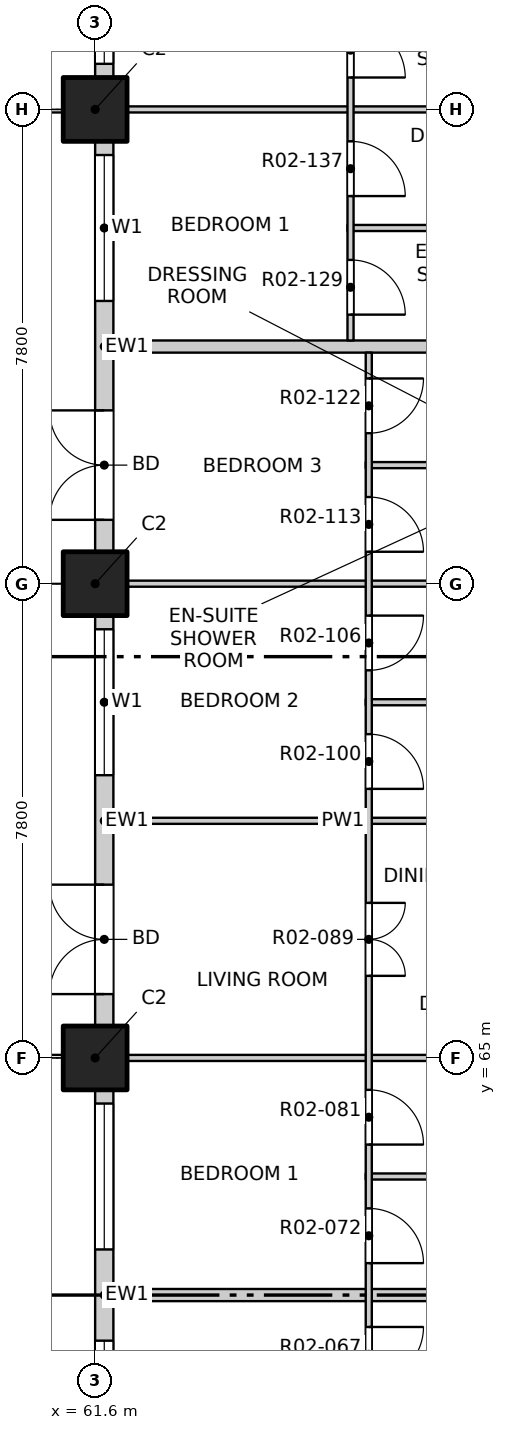
"""IFC4 building model, lengths in metres.
Left out: names, types, materials, properties, quantities, classifications, styles, units other than length and angle.
Written with IfcOpenShell. Run it as: python <this file> out.ifc"""

import sys

from ifc_helpers import new_model, si_unit, direction, frame, frame_2d, origin, origin_2d, place, context, subcontext, project, spatial, rectangle, extrude, element, fill, save


model = new_model("IFC4")
c1 = context("Model", 3, precision=1e-05, world=origin(), true_north=direction((0.0, 1.0)))
c2 = subcontext(c1, "Body", "Model", "MODEL_VIEW")
j1 = project(units=[si_unit("LENGTHUNIT", "METRE"), si_unit("PLANEANGLEUNIT", "RADIAN")], contexts=[c1])
p1 = place(None, origin())
s1 = spatial("IfcSite", under=j1, at=p1, CompositionType="ELEMENT")
p2 = place(p1, origin())
s2 = spatial("IfcBuilding", under=s1, at=p2, CompositionType="ELEMENT")
p3 = place(p2, frame((0.0, 0.0, 36.5)))
s3 = spatial("IfcBuildingStorey", under=s2, at=p3, CompositionType="ELEMENT", Elevation=36.5)
for number, where, z_axis, x_axis in (
    (1, (61.6, 65.0, -0.25), (0.0, 0.0, 1.0), (1.0, 0.0, 0.0)),
    (2, (61.6, 72.8, -0.25), (0.0, 0.0, 1.0), (1.0, 0.0, 0.0)),
    (3, (61.6, 80.6, -0.25), (0.0, 0.0, 1.0), (1.0, 0.0, 0.0)),
):
    element("IfcColumn", number, at=place(p3, frame(where, z_axis=z_axis, x_axis=x_axis)), inside=s3, PredefinedType="COLUMN", context=c2, shape_type="SweptSolid", body=[
        extrude(rectangle(XDim=1.05, YDim=1.05, at=origin_2d()), origin(), (0.0, 0.0, 1.0), 3.4),
    ])
p4 = place(p3, frame((61.75, 57.725, 0.0), z_axis=(0.0, 0.0, 1.0), x_axis=(0.0, 1.0, 0.0)))
e4 = element("IfcWall", 4, at=p4, inside=s3, PredefinedType="SOLIDWALL", context=c2, shape_type="SweptSolid", body=[
    extrude(rectangle(XDim=6.75, YDim=0.3, at=frame_2d((3.375, 0.0))), origin(), (0.0, 0.0, 1.0), 2.7),
])
p5 = place(p4, frame((0.225, 0.0, 0.9)))
e5 = element("IfcOpeningElement", 5, at=p5, cuts=e4, PredefinedType="OPENING", context=c2, shape_type="SweptSolid", body=[
    extrude(rectangle(XDim=2.4, YDim=1.8, at=frame_2d((1.2, 0.9))), frame((0.0, 0.16, 0.0), z_axis=(0.0, -1.0, 0.0), x_axis=(1.0, 0.0, 0.0)), (0.0, 0.0, 1.0), 0.32),
])
p6 = place(p4, frame((4.125, 0.0, 0.9)))
e6 = element("IfcOpeningElement", 6, at=p6, cuts=e4, PredefinedType="OPENING", context=c2, shape_type="SweptSolid", body=[
    extrude(rectangle(XDim=2.4, YDim=1.8, at=frame_2d((1.2, 0.9))), frame((0.0, 0.16, 0.0), z_axis=(0.0, -1.0, 0.0), x_axis=(1.0, 0.0, 0.0)), (0.0, 0.0, 1.0), 0.32),
])
p7 = place(p3, frame((61.75, 65.525, 0.0), z_axis=(0.0, 0.0, 1.0), x_axis=(0.0, 1.0, 0.0)))
e7 = element("IfcWall", 7, at=p7, inside=s3, PredefinedType="SOLIDWALL", context=c2, shape_type="SweptSolid", body=[
    extrude(rectangle(XDim=6.75, YDim=0.3, at=frame_2d((3.375, 0.0))), origin(), (0.0, 0.0, 1.0), 2.7),
])
p8 = place(p7, frame((0.525, 0.0, 0.0)))
e8 = element("IfcOpeningElement", 8, at=p8, cuts=e7, PredefinedType="OPENING", context=c2, shape_type="SweptSolid", body=[
    extrude(rectangle(XDim=1.8, YDim=2.4, at=frame_2d((0.9, 1.2))), frame((0.0, 0.16, 0.0), z_axis=(0.0, -1.0, 0.0), x_axis=(1.0, 0.0, 0.0)), (0.0, 0.0, 1.0), 0.32),
])
p9 = place(p7, frame((4.125, 0.0, 0.9)))
e9 = element("IfcOpeningElement", 9, at=p9, cuts=e7, PredefinedType="OPENING", context=c2, shape_type="SweptSolid", body=[
    extrude(rectangle(XDim=2.4, YDim=1.8, at=frame_2d((1.2, 0.9))), frame((0.0, 0.16, 0.0), z_axis=(0.0, -1.0, 0.0), x_axis=(1.0, 0.0, 0.0)), (0.0, 0.0, 1.0), 0.32),
])
p10 = place(p3, frame((61.75, 73.325, 0.0), z_axis=(0.0, 0.0, 1.0), x_axis=(0.0, 1.0, 0.0)))
e10 = element("IfcWall", 10, at=p10, inside=s3, PredefinedType="SOLIDWALL", context=c2, shape_type="SweptSolid", body=[
    extrude(rectangle(XDim=6.75, YDim=0.3, at=frame_2d((3.375, 0.0))), origin(), (0.0, 0.0, 1.0), 2.7),
])
p11 = place(p10, frame((0.525, 0.0, 0.0)))
e11 = element("IfcOpeningElement", 11, at=p11, cuts=e10, PredefinedType="OPENING", context=c2, shape_type="SweptSolid", body=[
    extrude(rectangle(XDim=1.8, YDim=2.4, at=frame_2d((0.9, 1.2))), frame((0.0, 0.16, 0.0), z_axis=(0.0, -1.0, 0.0), x_axis=(1.0, 0.0, 0.0)), (0.0, 0.0, 1.0), 0.32),
])
p12 = place(p10, frame((4.125, 0.0, 0.9)))
e12 = element("IfcOpeningElement", 12, at=p12, cuts=e10, PredefinedType="OPENING", context=c2, shape_type="SweptSolid", body=[
    extrude(rectangle(XDim=2.4, YDim=1.8, at=frame_2d((1.2, 0.9))), frame((0.0, 0.16, 0.0), z_axis=(0.0, -1.0, 0.0), x_axis=(1.0, 0.0, 0.0)), (0.0, 0.0, 1.0), 0.32),
])
p13 = place(p3, frame((61.75, 81.125, 0.0), z_axis=(0.0, 0.0, 1.0), x_axis=(0.0, 1.0, 0.0)))
e13 = element("IfcWall", 13, at=p13, inside=s3, PredefinedType="SOLIDWALL", context=c2, shape_type="SweptSolid", body=[
    extrude(rectangle(XDim=3.375, YDim=0.3, at=frame_2d((1.688, 0.0))), origin(), (0.0, 0.0, 1.0), 2.7),
])
p14 = place(p13, frame((0.225, 0.0, 0.9)))
e14 = element("IfcOpeningElement", 14, at=p14, cuts=e13, PredefinedType="OPENING", context=c2, shape_type="SweptSolid", body=[
    extrude(rectangle(XDim=2.4, YDim=1.8, at=frame_2d((1.2, 0.9))), frame((0.0, 0.16, 0.0), z_axis=(0.0, -1.0, 0.0), x_axis=(1.0, 0.0, 0.0)), (0.0, 0.0, 1.0), 0.32),
])
p15 = place(p3, frame((61.9, 61.1, 0.0), z_axis=(0.0, 0.0, 1.0), x_axis=(1.0, 0.0, 0.0)))
e15 = element("IfcWall", 15, at=p15, inside=s3, PredefinedType="PARTITIONING", context=c2, shape_type="SweptSolid", body=[
    extrude(rectangle(XDim=11.5, YDim=0.2, at=frame_2d((5.75, 0.0))), origin(), (0.0, 0.0, 1.0), 3.15),
])
p16 = place(p3, frame((66.05, 63.05, 0.0), z_axis=(0.0, 0.0, 1.0), x_axis=(1.0, 0.0, 0.0)))
e16 = element("IfcWall", 16, at=p16, inside=s3, PredefinedType="PARTITIONING", context=c2, shape_type="SweptSolid", body=[
    extrude(rectangle(XDim=3.4, YDim=0.1, at=frame_2d((1.7, 0.0))), origin(), (0.0, 0.0, 1.0), 3.15),
])
p17 = place(p3, frame((61.9, 65.0, 0.0), z_axis=(0.0, 0.0, 1.0), x_axis=(1.0, 0.0, 0.0)))
e17 = element("IfcWall", 17, at=p17, inside=s3, PredefinedType="PARTITIONING", context=c2, shape_type="SweptSolid", body=[
    extrude(rectangle(XDim=7.55, YDim=0.1, at=frame_2d((3.775, 0.0))), origin(), (0.0, 0.0, 1.0), 2.55),
])
p18 = place(p3, frame((61.9, 68.9, 0.0), z_axis=(0.0, 0.0, 1.0), x_axis=(1.0, 0.0, 0.0)))
e18 = element("IfcWall", 18, at=p18, inside=s3, PredefinedType="PARTITIONING", context=c2, shape_type="SweptSolid", body=[
    extrude(rectangle(XDim=7.55, YDim=0.1, at=frame_2d((3.775, 0.0))), origin(), (0.0, 0.0, 1.0), 3.15),
])
p19 = place(p3, frame((66.05, 70.85, 0.0), z_axis=(0.0, 0.0, 1.0), x_axis=(1.0, 0.0, 0.0)))
e19 = element("IfcWall", 19, at=p19, inside=s3, PredefinedType="PARTITIONING", context=c2, shape_type="SweptSolid", body=[
    extrude(rectangle(XDim=3.4, YDim=0.1, at=frame_2d((1.7, 0.0))), origin(), (0.0, 0.0, 1.0), 3.15),
])
p20 = place(p3, frame((61.9, 72.8, 0.0), z_axis=(0.0, 0.0, 1.0), x_axis=(1.0, 0.0, 0.0)))
e20 = element("IfcWall", 20, at=p20, inside=s3, PredefinedType="PARTITIONING", context=c2, shape_type="SweptSolid", body=[
    extrude(rectangle(XDim=7.55, YDim=0.1, at=frame_2d((3.775, 0.0))), origin(), (0.0, 0.0, 1.0), 2.55),
])
p21 = place(p3, frame((66.05, 74.75, 0.0), z_axis=(0.0, 0.0, 1.0), x_axis=(1.0, 0.0, 0.0)))
e21 = element("IfcWall", 21, at=p21, inside=s3, PredefinedType="PARTITIONING", context=c2, shape_type="SweptSolid", body=[
    extrude(rectangle(XDim=3.4, YDim=0.1, at=frame_2d((1.7, 0.0))), origin(), (0.0, 0.0, 1.0), 3.15),
])
p22 = place(p3, frame((61.9, 76.7, 0.0), z_axis=(0.0, 0.0, 1.0), x_axis=(1.0, 0.0, 0.0)))
e22 = element("IfcWall", 22, at=p22, inside=s3, PredefinedType="PARTITIONING", context=c2, shape_type="SweptSolid", body=[
    extrude(rectangle(XDim=11.5, YDim=0.2, at=frame_2d((5.75, 0.0))), origin(), (0.0, 0.0, 1.0), 3.15),
])
p23 = place(p3, frame((65.75, 78.65, 0.0), z_axis=(0.0, 0.0, 1.0), x_axis=(1.0, 0.0, 0.0)))
e23 = element("IfcWall", 23, at=p23, inside=s3, PredefinedType="PARTITIONING", context=c2, shape_type="SweptSolid", body=[
    extrude(rectangle(XDim=3.7, YDim=0.1, at=frame_2d((1.85, 0.0))), origin(), (0.0, 0.0, 1.0), 3.15),
])
p24 = place(p3, frame((61.9, 80.6, 0.0), z_axis=(0.0, 0.0, 1.0), x_axis=(1.0, 0.0, 0.0)))
e24 = element("IfcWall", 24, at=p24, inside=s3, PredefinedType="PARTITIONING", context=c2, shape_type="SweptSolid", body=[
    extrude(rectangle(XDim=7.55, YDim=0.1, at=frame_2d((3.775, 0.0))), origin(), (0.0, 0.0, 1.0), 2.55),
])
p25 = place(p3, frame((65.8, 76.8, 0.0), z_axis=(0.0, 0.0, 1.0), x_axis=(0.0, 1.0, 0.0)))
e25 = element("IfcWall", 25, at=p25, inside=s3, PredefinedType="PARTITIONING", context=c2, shape_type="SweptSolid", body=[
    extrude(rectangle(XDim=11.3, YDim=0.1, at=frame_2d((5.65, 0.0))), origin(), (0.0, 0.0, 1.0), 3.15),
])
p26 = place(p25, frame((0.425, 0.0, 0.0)))
e26 = element("IfcOpeningElement", 26, at=p26, cuts=e25, PredefinedType="OPENING", context=c2, shape_type="SweptSolid", body=[
    extrude(rectangle(XDim=0.9, YDim=2.1, at=frame_2d((0.45, 1.05))), frame((0.0, 0.06, 0.0), z_axis=(0.0, -1.0, 0.0), x_axis=(1.0, 0.0, 0.0)), (0.0, 0.0, 1.0), 0.12),
])
p27 = place(p25, frame((2.375, 0.0, 0.0)))
e27 = element("IfcOpeningElement", 27, at=p27, cuts=e25, PredefinedType="OPENING", context=c2, shape_type="SweptSolid", body=[
    extrude(rectangle(XDim=0.9, YDim=2.1, at=frame_2d((0.45, 1.05))), frame((0.0, 0.06, 0.0), z_axis=(0.0, -1.0, 0.0), x_axis=(1.0, 0.0, 0.0)), (0.0, 0.0, 1.0), 0.12),
])
p28 = place(p25, frame((4.325, 0.0, 0.0)))
e28 = element("IfcOpeningElement", 28, at=p28, cuts=e25, PredefinedType="OPENING", context=c2, shape_type="SweptSolid", body=[
    extrude(rectangle(XDim=0.9, YDim=2.1, at=frame_2d((0.45, 1.05))), frame((0.0, 0.06, 0.0), z_axis=(0.0, -1.0, 0.0), x_axis=(1.0, 0.0, 0.0)), (0.0, 0.0, 1.0), 0.12),
])
p29 = place(p25, frame((6.275, 0.0, 0.0)))
e29 = element("IfcOpeningElement", 29, at=p29, cuts=e25, PredefinedType="OPENING", context=c2, shape_type="SweptSolid", body=[
    extrude(rectangle(XDim=0.9, YDim=2.1, at=frame_2d((0.45, 1.05))), frame((0.0, 0.06, 0.0), z_axis=(0.0, -1.0, 0.0), x_axis=(1.0, 0.0, 0.0)), (0.0, 0.0, 1.0), 0.12),
])
p30 = place(p25, frame((9.05, 0.0, 0.0)))
e30 = element("IfcOpeningElement", 30, at=p30, cuts=e25, PredefinedType="OPENING", context=c2, shape_type="SweptSolid", body=[
    extrude(rectangle(XDim=1.2, YDim=2.1, at=frame_2d((0.6, 1.05))), frame((0.0, 0.06, 0.0), z_axis=(0.0, -1.0, 0.0), x_axis=(1.0, 0.0, 0.0)), (0.0, 0.0, 1.0), 0.12),
])
p31 = place(p3, frame((66.1, 41.9, 0.0), z_axis=(0.0, 0.0, 1.0), x_axis=(0.0, 1.0, 0.0)))
e31 = element("IfcWall", 31, at=p31, inside=s3, PredefinedType="PARTITIONING", context=c2, shape_type="SweptSolid", body=[
    extrude(rectangle(XDim=34.7, YDim=0.1, at=frame_2d((17.35, 0.0))), origin(), (0.0, 0.0, 1.0), 3.15),
])
p32 = place(p31, frame((1.05, 0.0, 0.0)))
e32 = element("IfcOpeningElement", 32, at=p32, cuts=e31, PredefinedType="OPENING", context=c2, shape_type="SweptSolid", body=[
    extrude(rectangle(XDim=1.2, YDim=2.1, at=frame_2d((0.6, 1.05))), frame((0.0, 0.06, 0.0), z_axis=(0.0, -1.0, 0.0), x_axis=(1.0, 0.0, 0.0)), (0.0, 0.0, 1.0), 0.12),
])
p33 = place(p31, frame((4.95, 0.0, 0.0)))
e33 = element("IfcOpeningElement", 33, at=p33, cuts=e31, PredefinedType="OPENING", context=c2, shape_type="SweptSolid", body=[
    extrude(rectangle(XDim=1.2, YDim=2.1, at=frame_2d((0.6, 1.05))), frame((0.0, 0.06, 0.0), z_axis=(0.0, -1.0, 0.0), x_axis=(1.0, 0.0, 0.0)), (0.0, 0.0, 1.0), 0.12),
])
p34 = place(p31, frame((8.025, 0.0, 0.0)))
e34 = element("IfcOpeningElement", 34, at=p34, cuts=e31, PredefinedType="OPENING", context=c2, shape_type="SweptSolid", body=[
    extrude(rectangle(XDim=0.9, YDim=2.1, at=frame_2d((0.45, 1.05))), frame((0.0, 0.06, 0.0), z_axis=(0.0, -1.0, 0.0), x_axis=(1.0, 0.0, 0.0)), (0.0, 0.0, 1.0), 0.12),
])
p35 = place(p31, frame((9.975, 0.0, 0.0)))
e35 = element("IfcOpeningElement", 35, at=p35, cuts=e31, PredefinedType="OPENING", context=c2, shape_type="SweptSolid", body=[
    extrude(rectangle(XDim=0.9, YDim=2.1, at=frame_2d((0.45, 1.05))), frame((0.0, 0.06, 0.0), z_axis=(0.0, -1.0, 0.0), x_axis=(1.0, 0.0, 0.0)), (0.0, 0.0, 1.0), 0.12),
])
p36 = place(p31, frame((12.75, 0.0, 0.0)))
e36 = element("IfcOpeningElement", 36, at=p36, cuts=e31, PredefinedType="OPENING", context=c2, shape_type="SweptSolid", body=[
    extrude(rectangle(XDim=1.2, YDim=2.1, at=frame_2d((0.6, 1.05))), frame((0.0, 0.06, 0.0), z_axis=(0.0, -1.0, 0.0), x_axis=(1.0, 0.0, 0.0)), (0.0, 0.0, 1.0), 0.12),
])
p37 = place(p31, frame((15.825, 0.0, 0.0)))
e37 = element("IfcOpeningElement", 37, at=p37, cuts=e31, PredefinedType="OPENING", context=c2, shape_type="SweptSolid", body=[
    extrude(rectangle(XDim=0.9, YDim=2.1, at=frame_2d((0.45, 1.05))), frame((0.0, 0.06, 0.0), z_axis=(0.0, -1.0, 0.0), x_axis=(1.0, 0.0, 0.0)), (0.0, 0.0, 1.0), 0.12),
])
p38 = place(p31, frame((17.775, 0.0, 0.0)))
e38 = element("IfcOpeningElement", 38, at=p38, cuts=e31, PredefinedType="OPENING", context=c2, shape_type="SweptSolid", body=[
    extrude(rectangle(XDim=0.9, YDim=2.1, at=frame_2d((0.45, 1.05))), frame((0.0, 0.06, 0.0), z_axis=(0.0, -1.0, 0.0), x_axis=(1.0, 0.0, 0.0)), (0.0, 0.0, 1.0), 0.12),
])
p39 = place(p31, frame((19.725, 0.0, 0.0)))
e39 = element("IfcOpeningElement", 39, at=p39, cuts=e31, PredefinedType="OPENING", context=c2, shape_type="SweptSolid", body=[
    extrude(rectangle(XDim=0.9, YDim=2.1, at=frame_2d((0.45, 1.05))), frame((0.0, 0.06, 0.0), z_axis=(0.0, -1.0, 0.0), x_axis=(1.0, 0.0, 0.0)), (0.0, 0.0, 1.0), 0.12),
])
p40 = place(p31, frame((21.675, 0.0, 0.0)))
e40 = element("IfcOpeningElement", 40, at=p40, cuts=e31, PredefinedType="OPENING", context=c2, shape_type="SweptSolid", body=[
    extrude(rectangle(XDim=0.9, YDim=2.1, at=frame_2d((0.45, 1.05))), frame((0.0, 0.06, 0.0), z_axis=(0.0, -1.0, 0.0), x_axis=(1.0, 0.0, 0.0)), (0.0, 0.0, 1.0), 0.12),
])
p41 = place(p31, frame((24.45, 0.0, 0.0)))
e41 = element("IfcOpeningElement", 41, at=p41, cuts=e31, PredefinedType="OPENING", context=c2, shape_type="SweptSolid", body=[
    extrude(rectangle(XDim=1.2, YDim=2.1, at=frame_2d((0.6, 1.05))), frame((0.0, 0.06, 0.0), z_axis=(0.0, -1.0, 0.0), x_axis=(1.0, 0.0, 0.0)), (0.0, 0.0, 1.0), 0.12),
])
p42 = place(p31, frame((27.525, 0.0, 0.0)))
e42 = element("IfcOpeningElement", 42, at=p42, cuts=e31, PredefinedType="OPENING", context=c2, shape_type="SweptSolid", body=[
    extrude(rectangle(XDim=0.9, YDim=2.1, at=frame_2d((0.45, 1.05))), frame((0.0, 0.06, 0.0), z_axis=(0.0, -1.0, 0.0), x_axis=(1.0, 0.0, 0.0)), (0.0, 0.0, 1.0), 0.12),
])
p43 = place(p31, frame((29.475, 0.0, 0.0)))
e43 = element("IfcOpeningElement", 43, at=p43, cuts=e31, PredefinedType="OPENING", context=c2, shape_type="SweptSolid", body=[
    extrude(rectangle(XDim=0.9, YDim=2.1, at=frame_2d((0.45, 1.05))), frame((0.0, 0.06, 0.0), z_axis=(0.0, -1.0, 0.0), x_axis=(1.0, 0.0, 0.0)), (0.0, 0.0, 1.0), 0.12),
])
p44 = place(p31, frame((31.425, 0.0, 0.0)))
e44 = element("IfcOpeningElement", 44, at=p44, cuts=e31, PredefinedType="OPENING", context=c2, shape_type="SweptSolid", body=[
    extrude(rectangle(XDim=0.9, YDim=2.1, at=frame_2d((0.45, 1.05))), frame((0.0, 0.06, 0.0), z_axis=(0.0, -1.0, 0.0), x_axis=(1.0, 0.0, 0.0)), (0.0, 0.0, 1.0), 0.12),
])
p45 = place(p31, frame((33.375, 0.0, 0.0)))
e45 = element("IfcOpeningElement", 45, at=p45, cuts=e31, PredefinedType="OPENING", context=c2, shape_type="SweptSolid", body=[
    extrude(rectangle(XDim=0.9, YDim=2.1, at=frame_2d((0.45, 1.05))), frame((0.0, 0.06, 0.0), z_axis=(0.0, -1.0, 0.0), x_axis=(1.0, 0.0, 0.0)), (0.0, 0.0, 1.0), 0.12),
])
p46 = place(p5, origin())
e46 = element("IfcWindow", 46, at=p46, inside=s3, PartitioningType="DOUBLE_PANEL_VERTICAL", PredefinedType="WINDOW", context=c2, shape_type="SweptSolid", body=[
    extrude(rectangle(XDim=2.4, YDim=1.8, at=frame_2d((1.2, 0.9))), frame((0.0, 0.03, 0.0), z_axis=(0.0, -1.0, 0.0), x_axis=(1.0, 0.0, 0.0)), (0.0, 0.0, 1.0), 0.06),
])
fill(e5, e46)
p47 = place(p6, origin())
e47 = element("IfcWindow", 47, at=p47, inside=s3, PartitioningType="DOUBLE_PANEL_VERTICAL", PredefinedType="WINDOW", context=c2, shape_type="SweptSolid", body=[
    extrude(rectangle(XDim=2.4, YDim=1.8, at=frame_2d((1.2, 0.9))), frame((0.0, 0.03, 0.0), z_axis=(0.0, -1.0, 0.0), x_axis=(1.0, 0.0, 0.0)), (0.0, 0.0, 1.0), 0.06),
])
fill(e6, e47)
p48 = place(p8, origin())
e48 = element("IfcDoor", 48, at=p48, inside=s3, OperationType="DOUBLE_DOOR_SINGLE_SWING", PredefinedType="DOOR", context=c2, shape_type="SweptSolid", body=[
    extrude(rectangle(XDim=1.8, YDim=2.4, at=frame_2d((0.9, 1.2))), frame((0.0, 0.025, 0.0), z_axis=(0.0, -1.0, 0.0), x_axis=(1.0, 0.0, 0.0)), (0.0, 0.0, 1.0), 0.05),
])
fill(e8, e48)
p49 = place(p9, origin())
e49 = element("IfcWindow", 49, at=p49, inside=s3, PartitioningType="DOUBLE_PANEL_VERTICAL", PredefinedType="WINDOW", context=c2, shape_type="SweptSolid", body=[
    extrude(rectangle(XDim=2.4, YDim=1.8, at=frame_2d((1.2, 0.9))), frame((0.0, 0.03, 0.0), z_axis=(0.0, -1.0, 0.0), x_axis=(1.0, 0.0, 0.0)), (0.0, 0.0, 1.0), 0.06),
])
fill(e9, e49)
p50 = place(p11, origin())
e50 = element("IfcDoor", 50, at=p50, inside=s3, OperationType="DOUBLE_DOOR_SINGLE_SWING", PredefinedType="DOOR", context=c2, shape_type="SweptSolid", body=[
    extrude(rectangle(XDim=1.8, YDim=2.4, at=frame_2d((0.9, 1.2))), frame((0.0, 0.025, 0.0), z_axis=(0.0, -1.0, 0.0), x_axis=(1.0, 0.0, 0.0)), (0.0, 0.0, 1.0), 0.05),
])
fill(e11, e50)
p51 = place(p12, origin())
e51 = element("IfcWindow", 51, at=p51, inside=s3, PartitioningType="DOUBLE_PANEL_VERTICAL", PredefinedType="WINDOW", context=c2, shape_type="SweptSolid", body=[
    extrude(rectangle(XDim=2.4, YDim=1.8, at=frame_2d((1.2, 0.9))), frame((0.0, 0.03, 0.0), z_axis=(0.0, -1.0, 0.0), x_axis=(1.0, 0.0, 0.0)), (0.0, 0.0, 1.0), 0.06),
])
fill(e12, e51)
p52 = place(p14, origin())
e52 = element("IfcWindow", 52, at=p52, inside=s3, PartitioningType="DOUBLE_PANEL_VERTICAL", PredefinedType="WINDOW", context=c2, shape_type="SweptSolid", body=[
    extrude(rectangle(XDim=2.4, YDim=1.8, at=frame_2d((1.2, 0.9))), frame((0.0, 0.03, 0.0), z_axis=(0.0, -1.0, 0.0), x_axis=(1.0, 0.0, 0.0)), (0.0, 0.0, 1.0), 0.06),
])
fill(e14, e52)
p53 = place(p38, origin())
e53 = element("IfcDoor", 53, at=p53, inside=s3, OperationType="SINGLE_SWING_LEFT", PredefinedType="DOOR", context=c2, shape_type="SweptSolid", body=[
    extrude(rectangle(XDim=0.9, YDim=2.1, at=frame_2d((0.45, 1.05))), frame((0.0, 0.025, 0.0), z_axis=(0.0, -1.0, 0.0), x_axis=(1.0, 0.0, 0.0)), (0.0, 0.0, 1.0), 0.05),
])
fill(e38, e53)
p54 = place(p39, origin())
e54 = element("IfcDoor", 54, at=p54, inside=s3, OperationType="SINGLE_SWING_RIGHT", PredefinedType="DOOR", context=c2, shape_type="SweptSolid", body=[
    extrude(rectangle(XDim=0.9, YDim=2.1, at=frame_2d((0.45, 1.05))), frame((0.0, 0.025, 0.0), z_axis=(0.0, -1.0, 0.0), x_axis=(1.0, 0.0, 0.0)), (0.0, 0.0, 1.0), 0.05),
])
fill(e39, e54)
p55 = place(p40, origin())
e55 = element("IfcDoor", 55, at=p55, inside=s3, OperationType="SINGLE_SWING_RIGHT", PredefinedType="DOOR", context=c2, shape_type="SweptSolid", body=[
    extrude(rectangle(XDim=0.9, YDim=2.1, at=frame_2d((0.45, 1.05))), frame((0.0, 0.025, 0.0), z_axis=(0.0, -1.0, 0.0), x_axis=(1.0, 0.0, 0.0)), (0.0, 0.0, 1.0), 0.05),
])
fill(e40, e55)
p56 = place(p41, origin())
e56 = element("IfcDoor", 56, at=p56, inside=s3, OperationType="DOUBLE_DOOR_SINGLE_SWING", PredefinedType="DOOR", context=c2, shape_type="SweptSolid", body=[
    extrude(rectangle(XDim=1.2, YDim=2.1, at=frame_2d((0.6, 1.05))), frame((0.0, 0.025, 0.0), z_axis=(0.0, -1.0, 0.0), x_axis=(1.0, 0.0, 0.0)), (0.0, 0.0, 1.0), 0.05),
])
fill(e41, e56)
p57 = place(p42, origin())
e57 = element("IfcDoor", 57, at=p57, inside=s3, OperationType="SINGLE_SWING_RIGHT", PredefinedType="DOOR", context=c2, shape_type="SweptSolid", body=[
    extrude(rectangle(XDim=0.9, YDim=2.1, at=frame_2d((0.45, 1.05))), frame((0.0, 0.025, 0.0), z_axis=(0.0, -1.0, 0.0), x_axis=(1.0, 0.0, 0.0)), (0.0, 0.0, 1.0), 0.05),
])
fill(e42, e57)
p58 = place(p43, origin())
e58 = element("IfcDoor", 58, at=p58, inside=s3, OperationType="SINGLE_SWING_LEFT", PredefinedType="DOOR", context=c2, shape_type="SweptSolid", body=[
    extrude(rectangle(XDim=0.9, YDim=2.1, at=frame_2d((0.45, 1.05))), frame((0.0, 0.025, 0.0), z_axis=(0.0, -1.0, 0.0), x_axis=(1.0, 0.0, 0.0)), (0.0, 0.0, 1.0), 0.05),
])
fill(e43, e58)
p59 = place(p44, origin())
e59 = element("IfcDoor", 59, at=p59, inside=s3, OperationType="SINGLE_SWING_RIGHT", PredefinedType="DOOR", context=c2, shape_type="SweptSolid", body=[
    extrude(rectangle(XDim=0.9, YDim=2.1, at=frame_2d((0.45, 1.05))), frame((0.0, 0.025, 0.0), z_axis=(0.0, -1.0, 0.0), x_axis=(1.0, 0.0, 0.0)), (0.0, 0.0, 1.0), 0.05),
])
fill(e44, e59)
p60 = place(p45, origin())
e60 = element("IfcDoor", 60, at=p60, inside=s3, OperationType="SINGLE_SWING_LEFT", PredefinedType="DOOR", context=c2, shape_type="SweptSolid", body=[
    extrude(rectangle(XDim=0.9, YDim=2.1, at=frame_2d((0.45, 1.05))), frame((0.0, 0.025, 0.0), z_axis=(0.0, -1.0, 0.0), x_axis=(1.0, 0.0, 0.0)), (0.0, 0.0, 1.0), 0.05),
])
fill(e45, e60)
p61 = place(p26, origin())
e61 = element("IfcDoor", 61, at=p61, inside=s3, OperationType="SINGLE_SWING_RIGHT", PredefinedType="DOOR", context=c2, shape_type="SweptSolid", body=[
    extrude(rectangle(XDim=0.9, YDim=2.1, at=frame_2d((0.45, 1.05))), frame((0.0, 0.025, 0.0), z_axis=(0.0, -1.0, 0.0), x_axis=(1.0, 0.0, 0.0)), (0.0, 0.0, 1.0), 0.05),
])
fill(e26, e61)
p62 = place(p27, origin())
e62 = element("IfcDoor", 62, at=p62, inside=s3, OperationType="SINGLE_SWING_RIGHT", PredefinedType="DOOR", context=c2, shape_type="SweptSolid", body=[
    extrude(rectangle(XDim=0.9, YDim=2.1, at=frame_2d((0.45, 1.05))), frame((0.0, 0.025, 0.0), z_axis=(0.0, -1.0, 0.0), x_axis=(1.0, 0.0, 0.0)), (0.0, 0.0, 1.0), 0.05),
])
fill(e27, e62)
p63 = place(p28, origin())
e63 = element("IfcDoor", 63, at=p63, inside=s3, OperationType="SINGLE_SWING_RIGHT", PredefinedType="DOOR", context=c2, shape_type="SweptSolid", body=[
    extrude(rectangle(XDim=0.9, YDim=2.1, at=frame_2d((0.45, 1.05))), frame((0.0, 0.025, 0.0), z_axis=(0.0, -1.0, 0.0), x_axis=(1.0, 0.0, 0.0)), (0.0, 0.0, 1.0), 0.05),
])
fill(e28, e63)
save(model, sys.argv[1])
